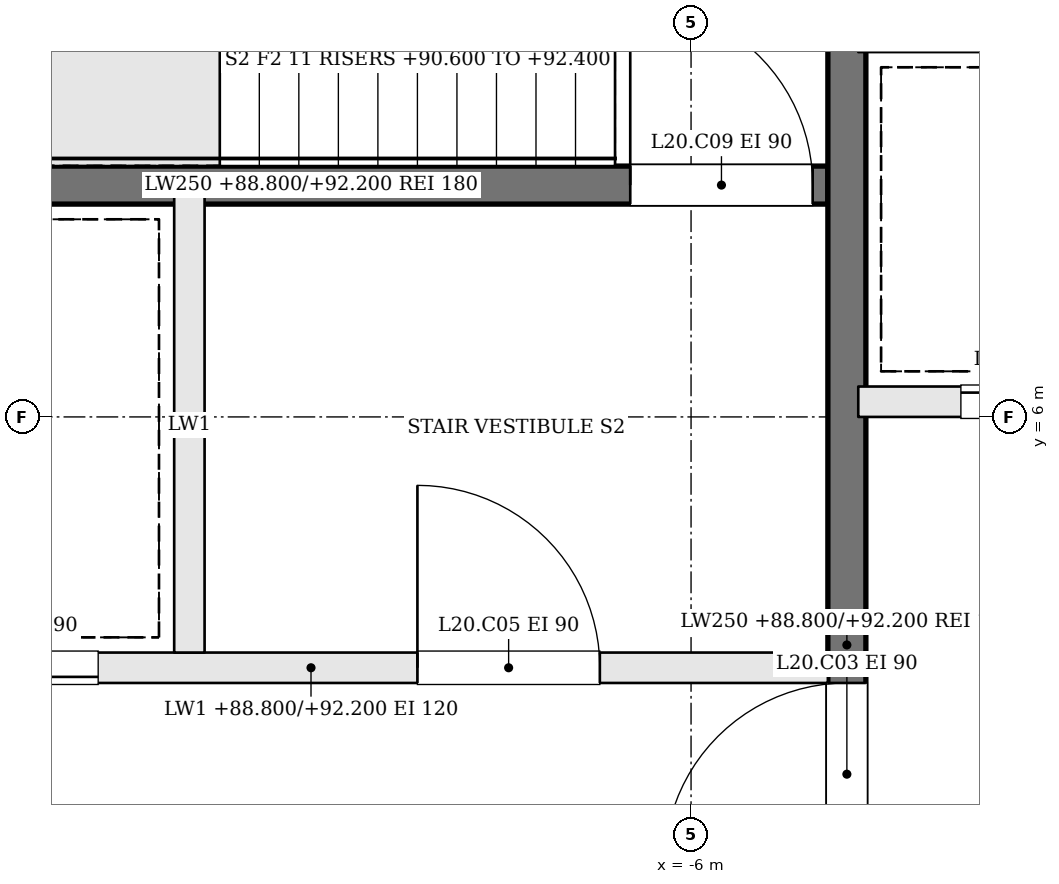
"""IFC4 building model, lengths in metres.
Left out: names, types, materials, properties, quantities, classifications, styles, units other than length and angle.
Written with IfcOpenShell. Run it as: python <this file> out.ifc"""

import sys

from ifc_helpers import new_model, si_unit, direction, frame, frame_2d, origin, place, context, subcontext, project, spatial, rectangle, extrude, element, fill, save


model = new_model("IFC4")
c1 = context("Model", 3, precision=1e-05, world=origin(), true_north=direction((0.0, 1.0)))
c2 = subcontext(c1, "Body", "Model", "MODEL_VIEW")
j1 = project(units=[si_unit("LENGTHUNIT", "METRE"), si_unit("PLANEANGLEUNIT", "RADIAN")], contexts=[c1])
p1 = place(None, origin())
s1 = spatial("IfcSite", under=j1, at=p1, CompositionType="ELEMENT")
p2 = place(p1, origin())
s2 = spatial("IfcBuilding", under=s1, at=p2, CompositionType="ELEMENT")
p3 = place(p2, frame((0.0, 0.0, 88.8)))
s3 = spatial("IfcBuildingStorey", under=s2, at=p3, CompositionType="ELEMENT", Elevation=88.8)
p4 = place(p3, frame((-11.9, 4.35, 0.0), z_axis=(0.0, 0.0, 1.0), x_axis=(1.0, 0.0, 0.0)))
e1 = element("IfcWall", 1, at=p4, inside=s3, PredefinedType="SOLIDWALL", context=c2, shape_type="SweptSolid", body=[
    extrude(rectangle(XDim=6.8, YDim=0.2, at=frame_2d((3.4, 0.0))), origin(), (0.0, 0.0, 1.0), 3.4),
])
p5 = place(p4, frame((4.1, 0.0, 0.0)))
e2 = element("IfcOpeningElement", 2, at=p5, cuts=e1, PredefinedType="OPENING", context=c2, shape_type="SweptSolid", body=[
    extrude(rectangle(XDim=1.2, YDim=2.1, at=frame_2d((0.6, 1.05))), frame((0.0, 0.11, 0.0), z_axis=(0.0, -1.0, 0.0), x_axis=(1.0, 0.0, 0.0)), (0.0, 0.0, 1.0), 0.22),
])
p6 = place(p4, frame((0.8, 0.0, 0.0)))
e3 = element("IfcOpeningElement", 3, at=p6, cuts=e1, PredefinedType="OPENING", context=c2, shape_type="SweptSolid", body=[
    extrude(rectangle(XDim=1.2, YDim=2.1, at=frame_2d((0.6, 1.05))), frame((0.0, 0.11, 0.0), z_axis=(0.0, -1.0, 0.0), x_axis=(1.0, 0.0, 0.0)), (0.0, 0.0, 1.0), 0.22),
])
p7 = place(p3, frame((-11.9, 7.525, 0.0), z_axis=(0.0, 0.0, 1.0), x_axis=(1.0, 0.0, 0.0)))
e4 = element("IfcWall", 4, at=p7, inside=s3, PredefinedType="SOLIDWALL", context=c2, shape_type="SweptSolid", body=[
    extrude(rectangle(XDim=6.8, YDim=0.25, at=frame_2d((3.4, 0.0))), origin(), (0.0, 0.0, 1.0), 3.4),
])
p8 = place(p7, frame((5.5, 0.0, 0.0)))
e5 = element("IfcOpeningElement", 5, at=p8, cuts=e4, PredefinedType="OPENING", context=c2, shape_type="SweptSolid", body=[
    extrude(rectangle(XDim=1.2, YDim=2.1, at=frame_2d((0.6, 1.05))), frame((0.0, 0.135, 0.0), z_axis=(0.0, -1.0, 0.0), x_axis=(1.0, 0.0, 0.0)), (0.0, 0.0, 1.0), 0.27),
])
p9 = place(p3, frame((-9.3, 4.45, 0.0), z_axis=(0.0, 0.0, 1.0), x_axis=(0.0, 1.0, 0.0)))
e6 = element("IfcWall", 6, at=p9, inside=s3, PredefinedType="SOLIDWALL", context=c2, shape_type="SweptSolid", body=[
    extrude(rectangle(XDim=3.0, YDim=0.2, at=frame_2d((1.5, 0.0))), origin(), (0.0, 0.0, 1.0), 3.4),
])
p10 = place(p3, frame((-4.975, -1.9, 0.0), z_axis=(0.0, 0.0, 1.0), x_axis=(0.0, 1.0, 0.0)))
e7 = element("IfcWall", 7, at=p10, inside=s3, PredefinedType="SOLIDWALL", context=c2, shape_type="SweptSolid", body=[
    extrude(rectangle(XDim=12.8, YDim=0.25, at=frame_2d((6.4, 0.0))), origin(), (0.0, 0.0, 1.0), 3.4),
])
p11 = place(p10, frame((4.95, 0.0, 0.0)))
e8 = element("IfcOpeningElement", 8, at=p11, cuts=e7, PredefinedType="OPENING", context=c2, shape_type="SweptSolid", body=[
    extrude(rectangle(XDim=1.2, YDim=2.1, at=frame_2d((0.6, 1.05))), frame((0.0, 0.135, 0.0), z_axis=(0.0, -1.0, 0.0), x_axis=(1.0, 0.0, 0.0)), (0.0, 0.0, 1.0), 0.27),
])
p12 = place(p3, frame((-4.9, 6.1, 0.0), z_axis=(0.0, 0.0, 1.0), x_axis=(1.0, 0.0, 0.0)))
e9 = element("IfcWall", 9, at=p12, inside=s3, PredefinedType="SOLIDWALL", context=c2, shape_type="SweptSolid", body=[
    extrude(rectangle(XDim=9.8, YDim=0.2, at=frame_2d((4.9, 0.0))), origin(), (0.0, 0.0, 1.0), 3.4),
])
p13 = place(p12, frame((0.675, 0.0, 0.0)))
e10 = element("IfcOpeningElement", 10, at=p13, cuts=e9, PredefinedType="OPENING", context=c2, shape_type="SweptSolid", body=[
    extrude(rectangle(XDim=1.1, YDim=2.1, at=frame_2d((0.55, 1.05))), frame((0.0, 0.11, 0.0), z_axis=(0.0, -1.0, 0.0), x_axis=(1.0, 0.0, 0.0)), (0.0, 0.0, 1.0), 0.22),
])
p14 = place(p12, frame((3.125, 0.0, 0.0)))
e11 = element("IfcOpeningElement", 11, at=p14, cuts=e9, PredefinedType="OPENING", context=c2, shape_type="SweptSolid", body=[
    extrude(rectangle(XDim=1.1, YDim=2.1, at=frame_2d((0.55, 1.05))), frame((0.0, 0.11, 0.0), z_axis=(0.0, -1.0, 0.0), x_axis=(1.0, 0.0, 0.0)), (0.0, 0.0, 1.0), 0.22),
])
p15 = place(p12, frame((5.575, 0.0, 0.0)))
e12 = element("IfcOpeningElement", 12, at=p15, cuts=e9, PredefinedType="OPENING", context=c2, shape_type="SweptSolid", body=[
    extrude(rectangle(XDim=1.1, YDim=2.1, at=frame_2d((0.55, 1.05))), frame((0.0, 0.11, 0.0), z_axis=(0.0, -1.0, 0.0), x_axis=(1.0, 0.0, 0.0)), (0.0, 0.0, 1.0), 0.22),
])
p16 = place(p12, frame((8.025, 0.0, 0.0)))
e13 = element("IfcOpeningElement", 13, at=p16, cuts=e9, PredefinedType="OPENING", context=c2, shape_type="SweptSolid", body=[
    extrude(rectangle(XDim=1.1, YDim=2.1, at=frame_2d((0.55, 1.05))), frame((0.0, 0.11, 0.0), z_axis=(0.0, -1.0, 0.0), x_axis=(1.0, 0.0, 0.0)), (0.0, 0.0, 1.0), 0.22),
])
p17 = place(p11, origin())
e14 = element("IfcDoor", 14, at=p17, inside=s3, OperationType="SINGLE_SWING_LEFT", PredefinedType="DOOR", context=c2, shape_type="SweptSolid", body=[
    extrude(rectangle(XDim=1.2, YDim=2.1, at=frame_2d((0.6, 1.05))), frame((0.0, 0.025, 0.0), z_axis=(0.0, -1.0, 0.0), x_axis=(1.0, 0.0, 0.0)), (0.0, 0.0, 1.0), 0.05),
])
fill(e8, e14)
p18 = place(p5, origin())
e15 = element("IfcDoor", 15, at=p18, inside=s3, OperationType="SINGLE_SWING_LEFT", PredefinedType="DOOR", context=c2, shape_type="SweptSolid", body=[
    extrude(rectangle(XDim=1.2, YDim=2.1, at=frame_2d((0.6, 1.05))), frame((0.0, 0.025, 0.0), z_axis=(0.0, -1.0, 0.0), x_axis=(1.0, 0.0, 0.0)), (0.0, 0.0, 1.0), 0.05),
])
fill(e2, e15)
p19 = place(p8, origin())
e16 = element("IfcDoor", 16, at=p19, inside=s3, OperationType="SINGLE_SWING_LEFT", PredefinedType="DOOR", context=c2, shape_type="SweptSolid", body=[
    extrude(rectangle(XDim=1.2, YDim=2.1, at=frame_2d((0.6, 1.05))), frame((0.0, 0.025, 0.0), z_axis=(0.0, -1.0, 0.0), x_axis=(1.0, 0.0, 0.0)), (0.0, 0.0, 1.0), 0.05),
])
fill(e5, e16)
p20 = place(p6, origin())
e17 = element("IfcDoor", 17, at=p20, inside=s3, OperationType="SLIDING_TO_RIGHT", PredefinedType="DOOR", context=c2, shape_type="SweptSolid", body=[
    extrude(rectangle(XDim=1.2, YDim=2.1, at=frame_2d((0.6, 1.05))), frame((0.0, 0.025, 0.0), z_axis=(0.0, -1.0, 0.0), x_axis=(1.0, 0.0, 0.0)), (0.0, 0.0, 1.0), 0.05),
])
fill(e3, e17)
p21 = place(p13, origin())
e18 = element("IfcDoor", 18, at=p21, inside=s3, OperationType="SLIDING_TO_RIGHT", PredefinedType="DOOR", context=c2, shape_type="SweptSolid", body=[
    extrude(rectangle(XDim=1.1, YDim=2.1, at=frame_2d((0.55, 1.05))), frame((0.0, 0.025, 0.0), z_axis=(0.0, -1.0, 0.0), x_axis=(1.0, 0.0, 0.0)), (0.0, 0.0, 1.0), 0.05),
])
fill(e10, e18)
save(model, sys.argv[1])
